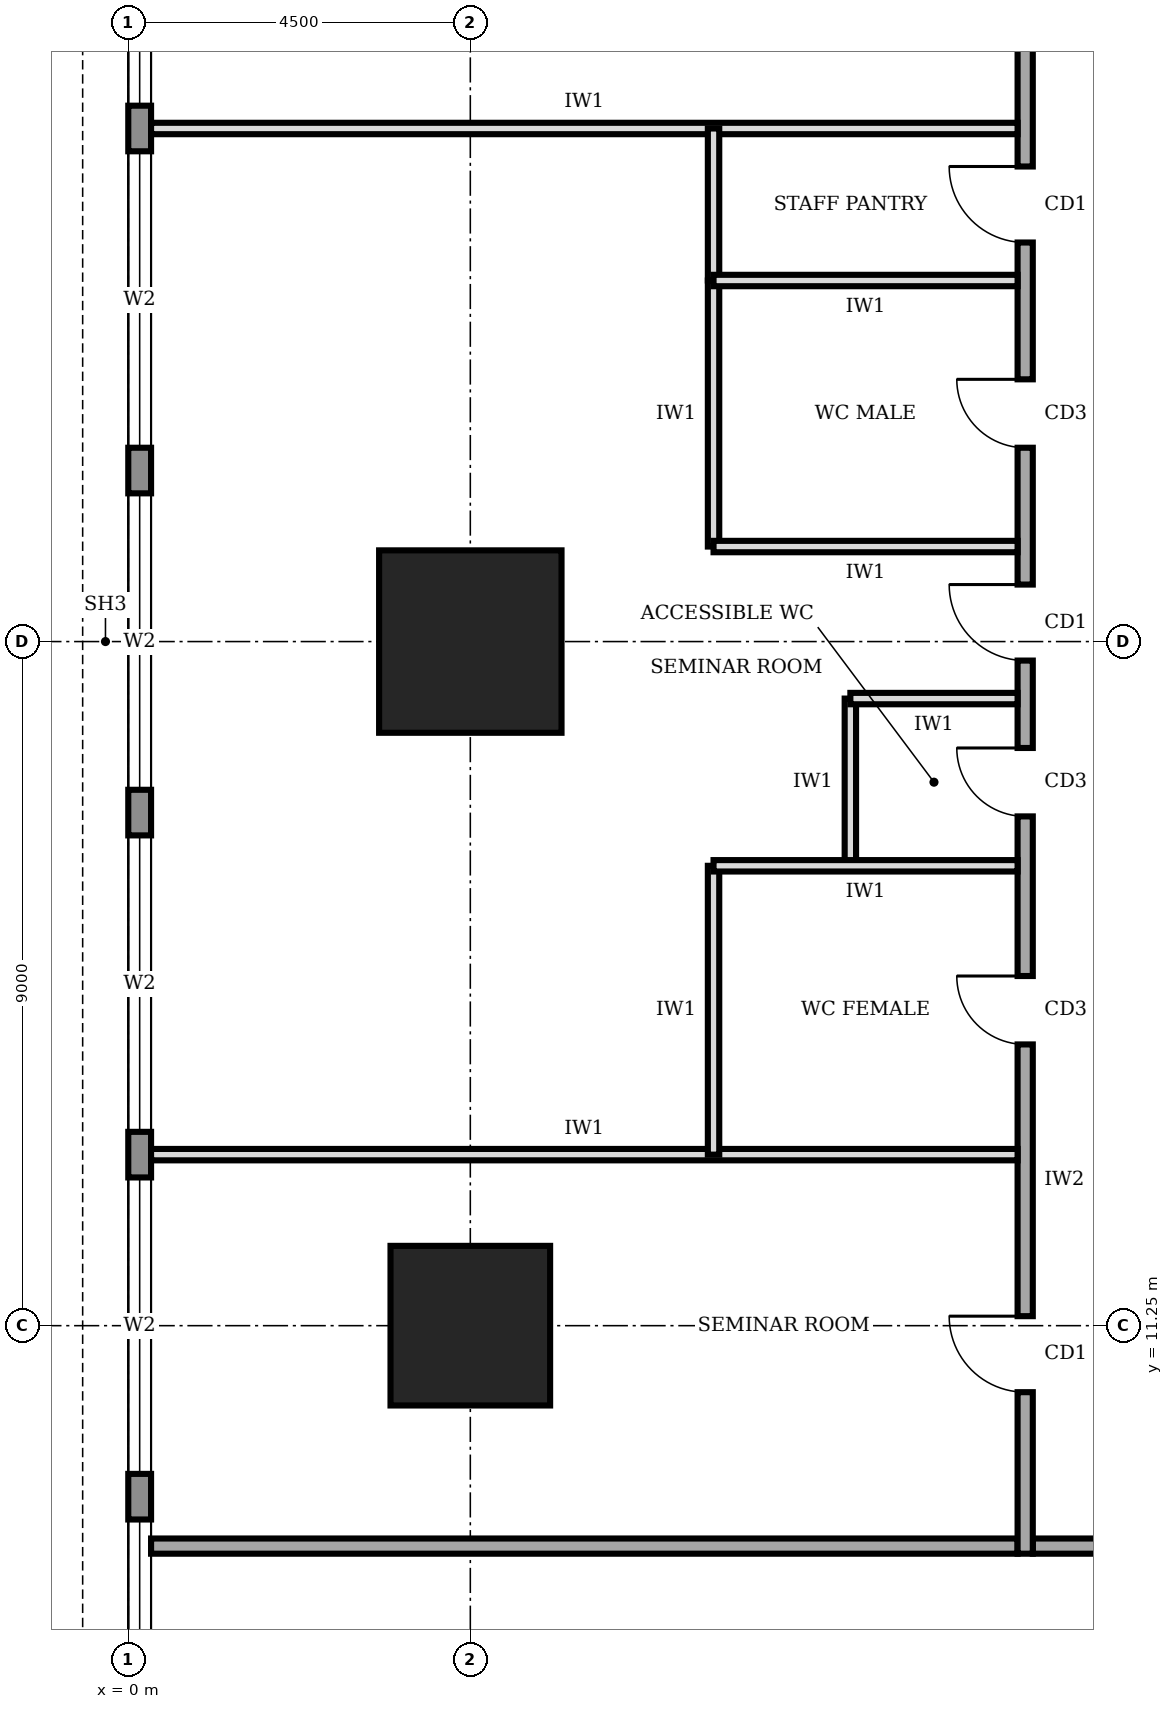
"""IFC4 building model, lengths in metres.
Left out: names, types, materials, properties, quantities, classifications, styles, units other than length and angle.
Written with IfcOpenShell. Run it as: python <this file> out.ifc"""

import sys

from ifc_helpers import new_model, si_unit, direction, frame, frame_2d, origin, origin_2d, place, context, subcontext, project, spatial, rectangle, extrude, element, fill, save


model = new_model("IFC4")
c1 = context("Model", 3, precision=1e-05, world=origin(), true_north=direction((0.0, 1.0)))
c2 = subcontext(c1, "Body", "Model", "MODEL_VIEW")
j1 = project(units=[si_unit("LENGTHUNIT", "METRE"), si_unit("PLANEANGLEUNIT", "RADIAN")], contexts=[c1])
p1 = place(None, origin())
s1 = spatial("IfcSite", under=j1, at=p1, CompositionType="ELEMENT")
p2 = place(p1, origin())
s2 = spatial("IfcBuilding", under=s1, at=p2, CompositionType="ELEMENT")
p3 = place(p2, frame((0.0, 0.0, 165.0)))
s3 = spatial("IfcBuildingStorey", under=s2, at=p3, CompositionType="ELEMENT", Elevation=165.0)
p4 = place(p3, frame((4.5, 11.25, 0.0), z_axis=(0.0, 0.0, 1.0), x_axis=(1.0, 0.0, 0.0)))
e1 = element("IfcColumn", 1, at=p4, inside=s3, PredefinedType="COLUMN", context=c2, shape_type="SweptSolid", body=[
    extrude(rectangle(XDim=2.1, YDim=2.1, at=origin_2d()), origin(), (0.0, 0.0, 1.0), 4.0),
])
p5 = place(p3, frame((4.5, 20.25, 0.0), z_axis=(0.0, 0.0, 1.0), x_axis=(1.0, 0.0, 0.0)))
e2 = element("IfcColumn", 2, at=p5, inside=s3, PredefinedType="COLUMN", context=c2, shape_type="SweptSolid", body=[
    extrude(rectangle(XDim=2.4, YDim=2.4, at=origin_2d()), origin(), (0.0, 0.0, 1.0), 4.0),
])
p6 = place(p3, frame((0.15, 35.98, 0.0), z_axis=(0.0, 0.0, 1.0), x_axis=(0.0, -1.0, 0.0)))
e3 = element("IfcWall", 3, at=p6, inside=s3, PredefinedType="STANDARD", context=c2, shape_type="SweptSolid", body=[
    extrude(rectangle(XDim=31.46, YDim=0.3, at=frame_2d((15.73, 0.0))), origin(), (0.0, 0.0, 1.0), 3.75),
])
p7 = place(p6, frame((27.28, 0.0, 0.6)))
e4 = element("IfcOpeningElement", 4, at=p7, cuts=e3, PredefinedType="OPENING", context=c2, shape_type="SweptSolid", body=[
    extrude(rectangle(XDim=3.9, YDim=2.6, at=frame_2d((1.95, 1.3))), frame((0.0, 0.16, 0.0), z_axis=(0.0, -1.0, 0.0), x_axis=(1.0, 0.0, 0.0)), (0.0, 0.0, 1.0), 0.32),
])
p8 = place(p6, frame((22.78, 0.0, 0.6)))
e5 = element("IfcOpeningElement", 5, at=p8, cuts=e3, PredefinedType="OPENING", context=c2, shape_type="SweptSolid", body=[
    extrude(rectangle(XDim=3.9, YDim=2.6, at=frame_2d((1.95, 1.3))), frame((0.0, 0.16, 0.0), z_axis=(0.0, -1.0, 0.0), x_axis=(1.0, 0.0, 0.0)), (0.0, 0.0, 1.0), 0.32),
])
p9 = place(p6, frame((18.28, 0.0, 0.6)))
e6 = element("IfcOpeningElement", 6, at=p9, cuts=e3, PredefinedType="OPENING", context=c2, shape_type="SweptSolid", body=[
    extrude(rectangle(XDim=3.9, YDim=2.6, at=frame_2d((1.95, 1.3))), frame((0.0, 0.16, 0.0), z_axis=(0.0, -1.0, 0.0), x_axis=(1.0, 0.0, 0.0)), (0.0, 0.0, 1.0), 0.32),
])
p10 = place(p6, frame((13.78, 0.0, 0.6)))
e7 = element("IfcOpeningElement", 7, at=p10, cuts=e3, PredefinedType="OPENING", context=c2, shape_type="SweptSolid", body=[
    extrude(rectangle(XDim=3.9, YDim=2.6, at=frame_2d((1.95, 1.3))), frame((0.0, 0.16, 0.0), z_axis=(0.0, -1.0, 0.0), x_axis=(1.0, 0.0, 0.0)), (0.0, 0.0, 1.0), 0.32),
])
p11 = place(p6, frame((9.28, 0.0, 0.6)))
e8 = element("IfcOpeningElement", 8, at=p11, cuts=e3, PredefinedType="OPENING", context=c2, shape_type="SweptSolid", body=[
    extrude(rectangle(XDim=3.9, YDim=2.6, at=frame_2d((1.95, 1.3))), frame((0.0, 0.16, 0.0), z_axis=(0.0, -1.0, 0.0), x_axis=(1.0, 0.0, 0.0)), (0.0, 0.0, 1.0), 0.32),
])
p12 = place(p6, frame((4.78, 0.0, 0.6)))
e9 = element("IfcOpeningElement", 9, at=p12, cuts=e3, PredefinedType="OPENING", context=c2, shape_type="SweptSolid", body=[
    extrude(rectangle(XDim=3.9, YDim=2.6, at=frame_2d((1.95, 1.3))), frame((0.0, 0.16, 0.0), z_axis=(0.0, -1.0, 0.0), x_axis=(1.0, 0.0, 0.0)), (0.0, 0.0, 1.0), 0.32),
])
p13 = place(p3, frame((11.9, 8.35, 0.0), z_axis=(0.0, 0.0, 1.0), x_axis=(1.0, 0.0, 0.0)))
e10 = element("IfcWall", 10, at=p13, inside=s3, PredefinedType="SOLIDWALL", context=c2, shape_type="SweptSolid", body=[
    extrude(rectangle(XDim=28.3, YDim=0.2, at=frame_2d((14.15, 0.0))), origin(), (0.0, 0.0, 1.0), 3.75),
])
p14 = place(p13, frame((6.55, 0.0, 0.0)))
e11 = element("IfcOpeningElement", 11, at=p14, cuts=e10, PredefinedType="OPENING", context=c2, shape_type="SweptSolid", body=[
    extrude(rectangle(XDim=1.8, YDim=2.1, at=frame_2d((0.9, 1.05))), frame((0.0, 0.11, 0.0), z_axis=(0.0, -1.0, 0.0), x_axis=(1.0, 0.0, 0.0)), (0.0, 0.0, 1.0), 0.22),
])
p15 = place(p13, frame((21.3, 0.0, 0.0)))
e12 = element("IfcOpeningElement", 12, at=p15, cuts=e10, PredefinedType="OPENING", context=c2, shape_type="SweptSolid", body=[
    extrude(rectangle(XDim=1.0, YDim=2.1, at=frame_2d((0.5, 1.05))), frame((0.0, 0.11, 0.0), z_axis=(0.0, -1.0, 0.0), x_axis=(1.0, 0.0, 0.0)), (0.0, 0.0, 1.0), 0.22),
])
p16 = place(p3, frame((11.8, 32.05, 0.0), z_axis=(0.0, 0.0, 1.0), x_axis=(0.0, -1.0, 0.0)))
e13 = element("IfcWall", 13, at=p16, inside=s3, PredefinedType="SOLIDWALL", context=c2, shape_type="SweptSolid", body=[
    extrude(rectangle(XDim=23.8, YDim=0.2, at=frame_2d((11.9, 0.0))), origin(), (0.0, 0.0, 1.0), 3.75),
])
p17 = place(p16, frame((20.675, 0.0, 0.0)))
e14 = element("IfcOpeningElement", 14, at=p17, cuts=e13, PredefinedType="OPENING", context=c2, shape_type="SweptSolid", body=[
    extrude(rectangle(XDim=1.0, YDim=2.1, at=frame_2d((0.5, 1.05))), frame((0.0, 0.11, 0.0), z_axis=(0.0, -1.0, 0.0), x_axis=(1.0, 0.0, 0.0)), (0.0, 0.0, 1.0), 0.22),
])
p18 = place(p16, frame((16.2, 0.0, 0.0)))
e15 = element("IfcOpeningElement", 15, at=p18, cuts=e13, PredefinedType="OPENING", context=c2, shape_type="SweptSolid", body=[
    extrude(rectangle(XDim=0.9, YDim=2.1, at=frame_2d((0.45, 1.05))), frame((0.0, 0.11, 0.0), z_axis=(0.0, -1.0, 0.0), x_axis=(1.0, 0.0, 0.0)), (0.0, 0.0, 1.0), 0.22),
])
p19 = place(p16, frame((13.2, 0.0, 0.0)))
e16 = element("IfcOpeningElement", 16, at=p19, cuts=e13, PredefinedType="OPENING", context=c2, shape_type="SweptSolid", body=[
    extrude(rectangle(XDim=0.9, YDim=2.1, at=frame_2d((0.45, 1.05))), frame((0.0, 0.11, 0.0), z_axis=(0.0, -1.0, 0.0), x_axis=(1.0, 0.0, 0.0)), (0.0, 0.0, 1.0), 0.22),
])
p20 = place(p16, frame((8.35, 0.0, 0.0)))
e17 = element("IfcOpeningElement", 17, at=p20, cuts=e13, PredefinedType="OPENING", context=c2, shape_type="SweptSolid", body=[
    extrude(rectangle(XDim=0.9, YDim=2.1, at=frame_2d((0.45, 1.05))), frame((0.0, 0.11, 0.0), z_axis=(0.0, -1.0, 0.0), x_axis=(1.0, 0.0, 0.0)), (0.0, 0.0, 1.0), 0.22),
])
p21 = place(p16, frame((5.55, 0.0, 0.0)))
e18 = element("IfcOpeningElement", 18, at=p21, cuts=e13, PredefinedType="OPENING", context=c2, shape_type="SweptSolid", body=[
    extrude(rectangle(XDim=1.0, YDim=2.1, at=frame_2d((0.5, 1.05))), frame((0.0, 0.11, 0.0), z_axis=(0.0, -1.0, 0.0), x_axis=(1.0, 0.0, 0.0)), (0.0, 0.0, 1.0), 0.22),
])
p22 = place(p16, frame((11.05, 0.0, 0.0)))
e19 = element("IfcOpeningElement", 19, at=p22, cuts=e13, PredefinedType="OPENING", context=c2, shape_type="SweptSolid", body=[
    extrude(rectangle(XDim=1.0, YDim=2.1, at=frame_2d((0.5, 1.05))), frame((0.0, 0.11, 0.0), z_axis=(0.0, -1.0, 0.0), x_axis=(1.0, 0.0, 0.0)), (0.0, 0.0, 1.0), 0.22),
])
p23 = place(p16, frame((1.925, 0.0, 0.0)))
e20 = element("IfcOpeningElement", 20, at=p23, cuts=e13, PredefinedType="OPENING", context=c2, shape_type="SweptSolid", body=[
    extrude(rectangle(XDim=1.0, YDim=2.1, at=frame_2d((0.5, 1.05))), frame((0.0, 0.11, 0.0), z_axis=(0.0, -1.0, 0.0), x_axis=(1.0, 0.0, 0.0)), (0.0, 0.0, 1.0), 0.22),
])
p24 = place(p3, frame((0.3, 8.35, 0.0), z_axis=(0.0, 0.0, 1.0), x_axis=(1.0, 0.0, 0.0)))
e21 = element("IfcWall", 21, at=p24, inside=s3, PredefinedType="SOLIDWALL", context=c2, shape_type="SweptSolid", body=[
    extrude(rectangle(XDim=11.4, YDim=0.2, at=frame_2d((5.7, 0.0))), origin(), (0.0, 0.0, 1.0), 3.75),
])
for number, where, z_axis, x_axis in (
    (22, (0.3, 13.5, 0.0), (0.0, 0.0, 1.0), (1.0, 0.0, 0.0)),
    (23, (0.3, 27.0, 0.0), (0.0, 0.0, 1.0), (1.0, 0.0, 0.0)),
):
    element("IfcWall", number, at=place(p3, frame(where, z_axis=z_axis, x_axis=x_axis)), inside=s3, PredefinedType="PARTITIONING", context=c2, shape_type="SweptSolid", body=[
        extrude(rectangle(XDim=11.4, YDim=0.15, at=frame_2d((5.7, 0.0))), origin(), (0.0, 0.0, 1.0), 3.75),
    ])
p25 = place(p3, frame((11.7, 17.3, 0.0), z_axis=(0.0, 0.0, 1.0), x_axis=(-1.0, 0.0, 0.0)))
e24 = element("IfcWall", 24, at=p25, inside=s3, PredefinedType="PARTITIONING", context=c2, shape_type="SweptSolid", body=[
    extrude(rectangle(XDim=4.0, YDim=0.15, at=frame_2d((2.0, 0.0))), origin(), (0.0, 0.0, 1.0), 3.75),
])
p26 = place(p3, frame((11.7, 19.5, 0.0), z_axis=(0.0, 0.0, 1.0), x_axis=(-1.0, 0.0, 0.0)))
e25 = element("IfcWall", 25, at=p26, inside=s3, PredefinedType="PARTITIONING", context=c2, shape_type="SweptSolid", body=[
    extrude(rectangle(XDim=2.2, YDim=0.15, at=frame_2d((1.1, 0.0))), origin(), (0.0, 0.0, 1.0), 3.75),
])
for number, where, z_axis, x_axis in (
    (26, (11.7, 21.5, 0.0), (0.0, 0.0, 1.0), (-1.0, 0.0, 0.0)),
    (27, (11.7, 25.0, 0.0), (0.0, 0.0, 1.0), (-1.0, 0.0, 0.0)),
):
    element("IfcWall", number, at=place(p3, frame(where, z_axis=z_axis, x_axis=x_axis)), inside=s3, PredefinedType="PARTITIONING", context=c2, shape_type="SweptSolid", body=[
        extrude(rectangle(XDim=4.0, YDim=0.15, at=frame_2d((2.0, 0.0))), origin(), (0.0, 0.0, 1.0), 3.75),
    ])
p27 = place(p3, frame((7.7, 13.5, 0.0), z_axis=(0.0, 0.0, 1.0), x_axis=(0.0, 1.0, 0.0)))
e28 = element("IfcWall", 28, at=p27, inside=s3, PredefinedType="PARTITIONING", context=c2, shape_type="SweptSolid", body=[
    extrude(rectangle(XDim=3.8, YDim=0.15, at=frame_2d((1.9, 0.0))), origin(), (0.0, 0.0, 1.0), 3.75),
])
p28 = place(p3, frame((9.5, 17.3, 0.0), z_axis=(0.0, 0.0, 1.0), x_axis=(0.0, 1.0, 0.0)))
e29 = element("IfcWall", 29, at=p28, inside=s3, PredefinedType="PARTITIONING", context=c2, shape_type="SweptSolid", body=[
    extrude(rectangle(XDim=2.2, YDim=0.15, at=frame_2d((1.1, 0.0))), origin(), (0.0, 0.0, 1.0), 3.75),
])
p29 = place(p3, frame((7.7, 21.5, 0.0), z_axis=(0.0, 0.0, 1.0), x_axis=(0.0, 1.0, 0.0)))
e30 = element("IfcWall", 30, at=p29, inside=s3, PredefinedType="PARTITIONING", context=c2, shape_type="SweptSolid", body=[
    extrude(rectangle(XDim=3.5, YDim=0.15, at=frame_2d((1.75, 0.0))), origin(), (0.0, 0.0, 1.0), 3.75),
])
p30 = place(p3, frame((7.7, 25.0, 0.0), z_axis=(0.0, 0.0, 1.0), x_axis=(0.0, 1.0, 0.0)))
e31 = element("IfcWall", 31, at=p30, inside=s3, PredefinedType="PARTITIONING", context=c2, shape_type="SweptSolid", body=[
    extrude(rectangle(XDim=2.0, YDim=0.15, at=frame_2d((1.0, 0.0))), origin(), (0.0, 0.0, 1.0), 3.75),
])
p31 = place(p7, origin())
e32 = element("IfcWindow", 32, at=p31, inside=s3, PartitioningType="SINGLE_PANEL", PredefinedType="WINDOW", context=c2, shape_type="SweptSolid", body=[
    extrude(rectangle(XDim=3.9, YDim=2.6, at=frame_2d((1.95, 1.3))), frame((0.0, 0.03, 0.0), z_axis=(0.0, -1.0, 0.0), x_axis=(1.0, 0.0, 0.0)), (0.0, 0.0, 1.0), 0.06),
])
fill(e4, e32)
p32 = place(p8, origin())
e33 = element("IfcWindow", 33, at=p32, inside=s3, PartitioningType="SINGLE_PANEL", PredefinedType="WINDOW", context=c2, shape_type="SweptSolid", body=[
    extrude(rectangle(XDim=3.9, YDim=2.6, at=frame_2d((1.95, 1.3))), frame((0.0, 0.03, 0.0), z_axis=(0.0, -1.0, 0.0), x_axis=(1.0, 0.0, 0.0)), (0.0, 0.0, 1.0), 0.06),
])
fill(e5, e33)
p33 = place(p9, origin())
e34 = element("IfcWindow", 34, at=p33, inside=s3, PartitioningType="SINGLE_PANEL", PredefinedType="WINDOW", context=c2, shape_type="SweptSolid", body=[
    extrude(rectangle(XDim=3.9, YDim=2.6, at=frame_2d((1.95, 1.3))), frame((0.0, 0.03, 0.0), z_axis=(0.0, -1.0, 0.0), x_axis=(1.0, 0.0, 0.0)), (0.0, 0.0, 1.0), 0.06),
])
fill(e6, e34)
p34 = place(p10, origin())
e35 = element("IfcWindow", 35, at=p34, inside=s3, PartitioningType="SINGLE_PANEL", PredefinedType="WINDOW", context=c2, shape_type="SweptSolid", body=[
    extrude(rectangle(XDim=3.9, YDim=2.6, at=frame_2d((1.95, 1.3))), frame((0.0, 0.03, 0.0), z_axis=(0.0, -1.0, 0.0), x_axis=(1.0, 0.0, 0.0)), (0.0, 0.0, 1.0), 0.06),
])
fill(e7, e35)
p35 = place(p11, origin())
e36 = element("IfcWindow", 36, at=p35, inside=s3, PartitioningType="SINGLE_PANEL", PredefinedType="WINDOW", context=c2, shape_type="SweptSolid", body=[
    extrude(rectangle(XDim=3.9, YDim=2.6, at=frame_2d((1.95, 1.3))), frame((0.0, 0.03, 0.0), z_axis=(0.0, -1.0, 0.0), x_axis=(1.0, 0.0, 0.0)), (0.0, 0.0, 1.0), 0.06),
])
fill(e8, e36)
p36 = place(p12, origin())
e37 = element("IfcWindow", 37, at=p36, inside=s3, PartitioningType="SINGLE_PANEL", PredefinedType="WINDOW", context=c2, shape_type="SweptSolid", body=[
    extrude(rectangle(XDim=3.9, YDim=2.6, at=frame_2d((1.95, 1.3))), frame((0.0, 0.03, 0.0), z_axis=(0.0, -1.0, 0.0), x_axis=(1.0, 0.0, 0.0)), (0.0, 0.0, 1.0), 0.06),
])
fill(e9, e37)
p37 = place(p17, frame((1.0, 0.0, 0.0), z_axis=(0.0, 0.0, 1.0), x_axis=(-1.0, 0.0, 0.0)))
e38 = element("IfcDoor", 38, at=p37, inside=s3, OperationType="SINGLE_SWING_RIGHT", PredefinedType="DOOR", context=c2, shape_type="SweptSolid", body=[
    extrude(rectangle(XDim=1.0, YDim=2.1, at=frame_2d((0.5, 1.05))), frame((0.0, 0.025, 0.0), z_axis=(0.0, -1.0, 0.0), x_axis=(1.0, 0.0, 0.0)), (0.0, 0.0, 1.0), 0.05),
])
fill(e14, e38)
p38 = place(p18, frame((0.9, 0.0, 0.0), z_axis=(0.0, 0.0, 1.0), x_axis=(-1.0, 0.0, 0.0)))
e39 = element("IfcDoor", 39, at=p38, inside=s3, OperationType="SINGLE_SWING_RIGHT", PredefinedType="DOOR", context=c2, shape_type="SweptSolid", body=[
    extrude(rectangle(XDim=0.9, YDim=2.1, at=frame_2d((0.45, 1.05))), frame((0.0, 0.025, 0.0), z_axis=(0.0, -1.0, 0.0), x_axis=(1.0, 0.0, 0.0)), (0.0, 0.0, 1.0), 0.05),
])
fill(e15, e39)
p39 = place(p19, frame((0.9, 0.0, 0.0), z_axis=(0.0, 0.0, 1.0), x_axis=(-1.0, 0.0, 0.0)))
e40 = element("IfcDoor", 40, at=p39, inside=s3, OperationType="SINGLE_SWING_RIGHT", PredefinedType="DOOR", context=c2, shape_type="SweptSolid", body=[
    extrude(rectangle(XDim=0.9, YDim=2.1, at=frame_2d((0.45, 1.05))), frame((0.0, 0.025, 0.0), z_axis=(0.0, -1.0, 0.0), x_axis=(1.0, 0.0, 0.0)), (0.0, 0.0, 1.0), 0.05),
])
fill(e16, e40)
p40 = place(p20, frame((0.9, 0.0, 0.0), z_axis=(0.0, 0.0, 1.0), x_axis=(-1.0, 0.0, 0.0)))
e41 = element("IfcDoor", 41, at=p40, inside=s3, OperationType="SINGLE_SWING_RIGHT", PredefinedType="DOOR", context=c2, shape_type="SweptSolid", body=[
    extrude(rectangle(XDim=0.9, YDim=2.1, at=frame_2d((0.45, 1.05))), frame((0.0, 0.025, 0.0), z_axis=(0.0, -1.0, 0.0), x_axis=(1.0, 0.0, 0.0)), (0.0, 0.0, 1.0), 0.05),
])
fill(e17, e41)
p41 = place(p21, frame((1.0, 0.0, 0.0), z_axis=(0.0, 0.0, 1.0), x_axis=(-1.0, 0.0, 0.0)))
e42 = element("IfcDoor", 42, at=p41, inside=s3, OperationType="SINGLE_SWING_RIGHT", PredefinedType="DOOR", context=c2, shape_type="SweptSolid", body=[
    extrude(rectangle(XDim=1.0, YDim=2.1, at=frame_2d((0.5, 1.05))), frame((0.0, 0.025, 0.0), z_axis=(0.0, -1.0, 0.0), x_axis=(1.0, 0.0, 0.0)), (0.0, 0.0, 1.0), 0.05),
])
fill(e18, e42)
p42 = place(p22, frame((1.0, 0.0, 0.0), z_axis=(0.0, 0.0, 1.0), x_axis=(-1.0, 0.0, 0.0)))
e43 = element("IfcDoor", 43, at=p42, inside=s3, OperationType="SINGLE_SWING_RIGHT", PredefinedType="DOOR", context=c2, shape_type="SweptSolid", body=[
    extrude(rectangle(XDim=1.0, YDim=2.1, at=frame_2d((0.5, 1.05))), frame((0.0, 0.025, 0.0), z_axis=(0.0, -1.0, 0.0), x_axis=(1.0, 0.0, 0.0)), (0.0, 0.0, 1.0), 0.05),
])
fill(e19, e43)
save(model, sys.argv[1])
